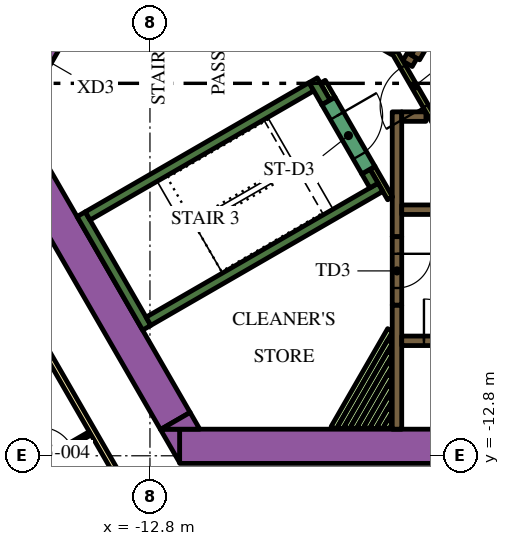
"""IFC4 building model, lengths in metres.
Left out: names, types, materials, properties, quantities, classifications, styles, units other than length and angle.
Written with IfcOpenShell. Run it as: python <this file> out.ifc"""

import sys

from ifc_helpers import new_model, si_unit, direction, frame, frame_2d, origin, place, context, subcontext, project, spatial, polyline, rectangle, outline, extrude, element, fill, save


model = new_model("IFC4")
c1 = context("Model", 3, precision=1e-05, world=origin(), true_north=direction((0.0, 1.0)))
c2 = subcontext(c1, "Body", "Model", "MODEL_VIEW")
j1 = project(units=[si_unit("LENGTHUNIT", "METRE"), si_unit("PLANEANGLEUNIT", "RADIAN")], contexts=[c1])
p1 = place(None, origin())
s1 = spatial("IfcSite", under=j1, at=p1, CompositionType="ELEMENT")
p2 = place(p1, origin())
s2 = spatial("IfcBuilding", under=s1, at=p2, CompositionType="ELEMENT")
p3 = place(p2, frame((0.0, 0.0, 74.4)))
s3 = spatial("IfcBuildingStorey", under=s2, at=p3, CompositionType="ELEMENT", Elevation=74.4)
p4 = place(p3, frame((-12.019, -12.55, 0.0), z_axis=(0.0, 0.0, 1.0), x_axis=(1.0, 0.0, 0.0)))
e1 = element("IfcWall", 1, at=p4, inside=s3, PredefinedType="SOLIDWALL", context=c2, shape_type="SweptSolid", body=[
    extrude(rectangle(XDim=21.63, YDim=0.9, at=frame_2d((10.815, 0.0))), origin(), (0.0, 0.0, 1.0), 3.9),
])
p5 = place(p3, origin())
e2 = element("IfcWall", 2, at=p5, inside=s3, PredefinedType="SOLIDWALL", context=c2, shape_type="SweptSolid", body=[
    extrude(outline(polyline([(-12.529, -12.1), (-12.021, -12.1), (-12.021, -12.98), (-12.529, -12.1)])), origin(), (0.0, 0.0, 1.0), 3.9),
])
p6 = place(p3, frame((-12.134, -11.883, 0.0), z_axis=(0.0, 0.0, 1.0), x_axis=(-0.500005339912, 0.866022320763, 0.0)))
e3 = element("IfcWall", 3, at=p6, inside=s3, PredefinedType="SOLIDWALL", context=c2, shape_type="SweptSolid", body=[
    extrude(rectangle(XDim=9.488, YDim=0.9, at=frame_2d((4.744, 0.0))), origin(), (0.0, 0.0, 1.0), 3.9),
])
e4 = element("IfcWall", 4, at=p5, inside=s3, PredefinedType="SOLIDWALL", context=c2, shape_type="SweptSolid", body=[
    extrude(outline(polyline([(-11.489, -12.1), (-12.505, -12.1), (-11.743, -11.66), (-11.489, -12.1)])), origin(), (0.0, 0.0, 1.0), 3.9),
])
p7 = place(p3, frame((-12.885, -9.431, 0.0), z_axis=(0.0, 0.0, 1.0), x_axis=(-0.500020560727, 0.866013532718, 0.0)))
e5 = element("IfcWall", 5, at=p7, inside=s3, PredefinedType="SOLIDWALL", context=c2, shape_type="SweptSolid", body=[
    extrude(rectangle(XDim=3.45, YDim=0.25, at=frame_2d((1.725, 0.0))), origin(), (0.0, 0.0, 1.0), 3.9),
])
p8 = place(p3, frame((-14.44, -6.49, 0.0), z_axis=(0.0, 0.0, 1.0), x_axis=(0.866022966069, 0.500004222222, 0.0)))
e6 = element("IfcWall", 6, at=p8, inside=s3, PredefinedType="SOLIDWALL", context=c2, shape_type="SweptSolid", body=[
    extrude(rectangle(XDim=6.8, YDim=0.25, at=frame_2d((3.4, 0.0))), origin(), (0.0, 0.0, 1.0), 3.9),
])
p9 = place(p3, frame((-8.168, -3.503, 0.0), z_axis=(0.0, 0.0, 1.0), x_axis=(-0.499952099219, 0.866053057547, 0.0)))
e7 = element("IfcWall", 7, at=p9, inside=s3, PredefinedType="SOLIDWALL", context=c2, shape_type="SweptSolid", body=[
    extrude(rectangle(XDim=0.675, YDim=0.25, at=frame_2d((0.337, 0.0))), origin(), (0.0, 0.0, 1.0), 3.9),
])
p10 = place(p3, frame((-12.84, -9.261, 0.0), z_axis=(0.0, 0.0, 1.0), x_axis=(0.866016039709, 0.500016218704, 0.0)))
e8 = element("IfcWall", 8, at=p10, inside=s3, PredefinedType="SOLIDWALL", context=c2, shape_type="SweptSolid", body=[
    extrude(rectangle(XDim=7.05, YDim=0.25, at=frame_2d((3.525, 0.0))), origin(), (0.0, 0.0, 1.0), 3.9),
])
p11 = place(p3, frame((-6.905, -5.69, 0.0), z_axis=(0.0, 0.0, 1.0), x_axis=(-0.500402024738, 0.865793170242, 0.0)))
e9 = element("IfcWall", 9, at=p11, inside=s3, PredefinedType="SOLIDWALL", context=c2, shape_type="SweptSolid", body=[
    extrude(rectangle(XDim=0.425, YDim=0.25, at=frame_2d((0.212, 0.0))), origin(), (0.0, 0.0, 1.0), 3.9),
])
p12 = place(p3, frame((-6.3, -12.1, 0.0), z_axis=(0.0, 0.0, 1.0), x_axis=(0.0, 1.0, 0.0)))
e10 = element("IfcWall", 10, at=p12, inside=s3, PredefinedType="SOLIDWALL", context=c2, shape_type="SweptSolid", body=[
    extrude(rectangle(XDim=3.265, YDim=0.25, at=frame_2d((1.632, 0.0))), origin(), (0.0, 0.0, 1.0), 3.9),
])
p13 = place(p3, frame((-6.3, -7.035, 0.0), z_axis=(0.0, 0.0, 1.0), x_axis=(0.0, 1.0, 0.0)))
e11 = element("IfcWall", 11, at=p13, inside=s3, PredefinedType="SOLIDWALL", context=c2, shape_type="SweptSolid", body=[
    extrude(rectangle(XDim=3.285, YDim=0.25, at=frame_2d((1.643, 0.0))), origin(), (0.0, 0.0, 1.0), 3.9),
])
p14 = place(p3, frame((-6.175, -3.875, 0.0), z_axis=(0.0, 0.0, 1.0), x_axis=(1.0, 0.0, 0.0)))
e12 = element("IfcWall", 12, at=p14, inside=s3, PredefinedType="SOLIDWALL", context=c2, shape_type="SweptSolid", body=[
    extrude(rectangle(XDim=0.637, YDim=0.25, at=frame_2d((0.318, 0.0))), origin(), (0.0, 0.0, 1.0), 3.9),
])
p15 = place(p3, frame((-6.088, -2.305, 0.0), z_axis=(0.0, 0.0, 1.0), x_axis=(0.866059450854, -0.499941024108, 0.0)))
e13 = element("IfcWall", 13, at=p15, inside=s3, PredefinedType="SOLIDWALL", context=c2, shape_type="SweptSolid", body=[
    extrude(rectangle(XDim=0.29, YDim=0.25, at=frame_2d((0.145, 0.0))), origin(), (0.0, 0.0, 1.0), 3.9),
])
p16 = place(p3, frame((-7.889, -1.265, 0.0), z_axis=(0.0, 0.0, 1.0), x_axis=(0.865986741702, -0.500066958712, 0.0)))
e14 = element("IfcWall", 14, at=p16, inside=s3, PredefinedType="SOLIDWALL", context=c2, shape_type="SweptSolid", body=[
    extrude(rectangle(XDim=1.738, YDim=0.25, at=frame_2d((0.869, 0.0))), origin(), (0.0, 0.0, 1.0), 3.9),
])
p17 = place(p3, frame((-7.968, -12.068, 0.0), z_axis=(0.0, 0.0, 1.0), x_axis=(0.500013701029, 0.866017493347, 0.0)))
e15 = element("IfcWall", 15, at=p17, inside=s3, PredefinedType="PARTITIONING", context=c2, shape_type="SweptSolid", body=[
    extrude(rectangle(XDim=2.975, YDim=0.15, at=frame_2d((1.488, 0.0))), origin(), (0.0, 0.0, 1.0), 2.7),
])
p18 = place(p3, frame((-7.794, -12.068, 0.0), z_axis=(0.0, 0.0, 1.0), x_axis=(0.499985098601, 0.86603400694, 0.0)))
e16 = element("IfcWall", 16, at=p18, inside=s3, PredefinedType="PARTITIONING", context=c2, shape_type="SweptSolid", body=[
    extrude(rectangle(XDim=2.628, YDim=0.15, at=frame_2d((1.314, 0.0))), origin(), (0.0, 0.0, 1.0), 2.7),
])
p19 = place(p3, frame((-7.621, -12.068, 0.0), z_axis=(0.0, 0.0, 1.0), x_axis=(0.500028047758, 0.866009209798, 0.0)))
e17 = element("IfcWall", 17, at=p19, inside=s3, PredefinedType="PARTITIONING", context=c2, shape_type="SweptSolid", body=[
    extrude(rectangle(XDim=2.282, YDim=0.15, at=frame_2d((1.141, 0.0))), origin(), (0.0, 0.0, 1.0), 2.7),
])
p20 = place(p3, frame((-7.448, -12.068, 0.0), z_axis=(0.0, 0.0, 1.0), x_axis=(0.500031751504, 0.866007071269, 0.0)))
e18 = element("IfcWall", 18, at=p20, inside=s3, PredefinedType="PARTITIONING", context=c2, shape_type="SweptSolid", body=[
    extrude(rectangle(XDim=1.936, YDim=0.15, at=frame_2d((0.968, 0.0))), origin(), (0.0, 0.0, 1.0), 2.7),
])
p21 = place(p3, frame((-7.275, -12.068, 0.0), z_axis=(0.0, 0.0, 1.0), x_axis=(0.499988385283, 0.86603210944, 0.0)))
e19 = element("IfcWall", 19, at=p21, inside=s3, PredefinedType="PARTITIONING", context=c2, shape_type="SweptSolid", body=[
    extrude(rectangle(XDim=1.589, YDim=0.15, at=frame_2d((0.795, 0.0))), origin(), (0.0, 0.0, 1.0), 2.7),
])
p22 = place(p3, frame((-7.102, -12.068, 0.0), z_axis=(0.0, 0.0, 1.0), x_axis=(0.500068153333, 0.865986051864, 0.0)))
e20 = element("IfcWall", 20, at=p22, inside=s3, PredefinedType="PARTITIONING", context=c2, shape_type="SweptSolid", body=[
    extrude(rectangle(XDim=1.243, YDim=0.15, at=frame_2d((0.622, 0.0))), origin(), (0.0, 0.0, 1.0), 2.7),
])
p23 = place(p3, frame((-6.928, -12.068, 0.0), z_axis=(0.0, 0.0, 1.0), x_axis=(0.500005339912, 0.866022320763, 0.0)))
e21 = element("IfcWall", 21, at=p23, inside=s3, PredefinedType="PARTITIONING", context=c2, shape_type="SweptSolid", body=[
    extrude(rectangle(XDim=0.896, YDim=0.15, at=frame_2d((0.448, 0.0))), origin(), (0.0, 0.0, 1.0), 2.7),
])
p24 = place(p3, frame((-6.755, -12.068, 0.0), z_axis=(0.0, 0.0, 1.0), x_axis=(0.500196256984, 0.865912065108, 0.0)))
e22 = element("IfcWall", 22, at=p24, inside=s3, PredefinedType="PARTITIONING", context=c2, shape_type="SweptSolid", body=[
    extrude(rectangle(XDim=0.55, YDim=0.15, at=frame_2d((0.275, 0.0))), origin(), (0.0, 0.0, 1.0), 2.7),
])
p25 = place(p3, frame((-6.582, -12.068, 0.0), z_axis=(0.0, 0.0, 1.0), x_axis=(0.499618727529, 0.866245419672, 0.0)))
e23 = element("IfcWall", 23, at=p25, inside=s3, PredefinedType="PARTITIONING", context=c2, shape_type="SweptSolid", body=[
    extrude(rectangle(XDim=0.204, YDim=0.15, at=frame_2d((0.102, 0.0))), origin(), (0.0, 0.0, 1.0), 2.7),
])
p26 = place(p3, frame((-6.48, -6.027, 0.0), z_axis=(0.0, 0.0, 1.0), x_axis=(-0.499927229454, 0.866067413802, 0.0)))
e24 = element("IfcWall", 24, at=p26, inside=s3, PredefinedType="PARTITIONING", context=c2, shape_type="SweptSolid", body=[
    extrude(rectangle(XDim=0.929, YDim=0.15, at=frame_2d((0.464, 0.0))), origin(), (0.0, 0.0, 1.0), 3.9),
])
p27 = place(p3, frame((-8.252, -2.958, 0.0), z_axis=(0.0, 0.0, 1.0), x_axis=(0.500174715838, -0.865924508047, 0.0)))
e25 = element("IfcWall", 25, at=p27, inside=s3, PredefinedType="PARTITIONING", context=c2, shape_type="SweptSolid", body=[
    extrude(rectangle(XDim=0.514, YDim=0.15, at=frame_2d((0.257, 0.0))), origin(), (0.0, 0.0, 1.0), 2.7),
])
p28 = place(p3, frame((-6.175, -9.775, 0.0), z_axis=(0.0, 0.0, 1.0), x_axis=(1.0, 0.0, 0.0)))
e26 = element("IfcWall", 26, at=p28, inside=s3, PredefinedType="SOLIDWALL", context=c2, shape_type="SweptSolid", body=[
    extrude(rectangle(XDim=12.35, YDim=0.25, at=frame_2d((6.175, 0.0))), origin(), (0.0, 0.0, 1.0), 3.9),
])
p29 = place(p28, frame((0.585, 0.0, 0.0)))
e27 = element("IfcOpeningElement", 27, at=p29, cuts=e26, PredefinedType="OPENING", context=c2, shape_type="SweptSolid", body=[
    extrude(rectangle(XDim=1.1, YDim=2.1, at=frame_2d((0.55, 1.05))), frame((0.0, 0.135, 0.0), z_axis=(0.0, -1.0, 0.0), x_axis=(1.0, 0.0, 0.0)), (0.0, 0.0, 1.0), 0.27),
])
p30 = place(p28, frame((3.105, 0.0, 0.0)))
e28 = element("IfcOpeningElement", 28, at=p30, cuts=e26, PredefinedType="OPENING", context=c2, shape_type="SweptSolid", body=[
    extrude(rectangle(XDim=1.1, YDim=2.1, at=frame_2d((0.55, 1.05))), frame((0.0, 0.135, 0.0), z_axis=(0.0, -1.0, 0.0), x_axis=(1.0, 0.0, 0.0)), (0.0, 0.0, 1.0), 0.27),
])
p31 = place(p28, frame((5.625, 0.0, 0.0)))
e29 = element("IfcOpeningElement", 29, at=p31, cuts=e26, PredefinedType="OPENING", context=c2, shape_type="SweptSolid", body=[
    extrude(rectangle(XDim=1.1, YDim=2.1, at=frame_2d((0.55, 1.05))), frame((0.0, 0.135, 0.0), z_axis=(0.0, -1.0, 0.0), x_axis=(1.0, 0.0, 0.0)), (0.0, 0.0, 1.0), 0.27),
])
p32 = place(p28, frame((8.145, 0.0, 0.0)))
e30 = element("IfcOpeningElement", 30, at=p32, cuts=e26, PredefinedType="OPENING", context=c2, shape_type="SweptSolid", body=[
    extrude(rectangle(XDim=1.1, YDim=2.1, at=frame_2d((0.55, 1.05))), frame((0.0, 0.135, 0.0), z_axis=(0.0, -1.0, 0.0), x_axis=(1.0, 0.0, 0.0)), (0.0, 0.0, 1.0), 0.27),
])
p33 = place(p28, frame((10.665, 0.0, 0.0)))
e31 = element("IfcOpeningElement", 31, at=p33, cuts=e26, PredefinedType="OPENING", context=c2, shape_type="SweptSolid", body=[
    extrude(rectangle(XDim=1.1, YDim=2.1, at=frame_2d((0.55, 1.05))), frame((0.0, 0.135, 0.0), z_axis=(0.0, -1.0, 0.0), x_axis=(1.0, 0.0, 0.0)), (0.0, 0.0, 1.0), 0.27),
])
p34 = place(p3, frame((-6.175, -6.325, 0.0), z_axis=(0.0, 0.0, 1.0), x_axis=(1.0, 0.0, 0.0)))
e32 = element("IfcWall", 32, at=p34, inside=s3, PredefinedType="SOLIDWALL", context=c2, shape_type="SweptSolid", body=[
    extrude(rectangle(XDim=12.35, YDim=0.25, at=frame_2d((6.175, 0.0))), origin(), (0.0, 0.0, 1.0), 3.9),
])
p35 = place(p34, frame((3.205, 0.0, 0.0)))
e33 = element("IfcOpeningElement", 33, at=p35, cuts=e32, PredefinedType="OPENING", context=c2, shape_type="SweptSolid", body=[
    extrude(rectangle(XDim=0.9, YDim=2.1, at=frame_2d((0.45, 1.05))), frame((0.0, 0.135, 0.0), z_axis=(0.0, -1.0, 0.0), x_axis=(1.0, 0.0, 0.0)), (0.0, 0.0, 1.0), 0.27),
])
p36 = place(p34, frame((8.145, 0.0, 0.0)))
e34 = element("IfcOpeningElement", 34, at=p36, cuts=e32, PredefinedType="OPENING", context=c2, shape_type="SweptSolid", body=[
    extrude(rectangle(XDim=1.1, YDim=2.1, at=frame_2d((0.55, 1.05))), frame((0.0, 0.135, 0.0), z_axis=(0.0, -1.0, 0.0), x_axis=(1.0, 0.0, 0.0)), (0.0, 0.0, 1.0), 0.27),
])
p37 = place(p34, frame((10.665, 0.0, 0.0)))
e35 = element("IfcOpeningElement", 35, at=p37, cuts=e32, PredefinedType="OPENING", context=c2, shape_type="SweptSolid", body=[
    extrude(rectangle(XDim=1.1, YDim=2.1, at=frame_2d((0.55, 1.05))), frame((0.0, 0.135, 0.0), z_axis=(0.0, -1.0, 0.0), x_axis=(1.0, 0.0, 0.0)), (0.0, 0.0, 1.0), 0.27),
])
p38 = place(p3, frame((-0.898, 6.194, 0.0), z_axis=(0.0, 0.0, 1.0), x_axis=(-0.499996202215, -0.866027596426, 0.0)))
e36 = element("IfcWall", 36, at=p38, inside=s3, PredefinedType="SOLIDWALL", context=c2, shape_type="SweptSolid", body=[
    extrude(rectangle(XDim=9.83, YDim=0.25, at=frame_2d((4.915, 0.0))), origin(), (0.0, 0.0, 1.0), 3.9),
])
p39 = place(p38, frame((0.585, 0.0, 0.0)))
e37 = element("IfcOpeningElement", 37, at=p39, cuts=e36, PredefinedType="OPENING", context=c2, shape_type="SweptSolid", body=[
    extrude(rectangle(XDim=1.1, YDim=2.1, at=frame_2d((0.55, 1.05))), frame((0.0, 0.135, 0.0), z_axis=(0.0, -1.0, 0.0), x_axis=(1.0, 0.0, 0.0)), (0.0, 0.0, 1.0), 0.27),
])
p40 = place(p38, frame((3.105, 0.0, 0.0)))
e38 = element("IfcOpeningElement", 38, at=p40, cuts=e36, PredefinedType="OPENING", context=c2, shape_type="SweptSolid", body=[
    extrude(rectangle(XDim=1.1, YDim=2.1, at=frame_2d((0.55, 1.05))), frame((0.0, 0.135, 0.0), z_axis=(0.0, -1.0, 0.0), x_axis=(1.0, 0.0, 0.0)), (0.0, 0.0, 1.0), 0.27),
])
p41 = place(p38, frame((5.625, 0.0, 0.0)))
e39 = element("IfcOpeningElement", 39, at=p41, cuts=e36, PredefinedType="OPENING", context=c2, shape_type="SweptSolid", body=[
    extrude(rectangle(XDim=1.1, YDim=2.1, at=frame_2d((0.55, 1.05))), frame((0.0, 0.135, 0.0), z_axis=(0.0, -1.0, 0.0), x_axis=(1.0, 0.0, 0.0)), (0.0, 0.0, 1.0), 0.27),
])
p42 = place(p38, frame((8.145, 0.0, 0.0)))
e40 = element("IfcOpeningElement", 40, at=p42, cuts=e36, PredefinedType="OPENING", context=c2, shape_type="SweptSolid", body=[
    extrude(rectangle(XDim=1.1, YDim=2.1, at=frame_2d((0.55, 1.05))), frame((0.0, 0.135, 0.0), z_axis=(0.0, -1.0, 0.0), x_axis=(1.0, 0.0, 0.0)), (0.0, 0.0, 1.0), 0.27),
])
p43 = place(p3, frame((-8.103, -3.466, 0.0), z_axis=(0.0, 0.0, 1.0), x_axis=(0.500078061341, -0.865980330357, 0.0)))
e41 = element("IfcWall", 41, at=p43, inside=s3, PredefinedType="SOLIDWALL", context=c2, shape_type="SweptSolid", body=[
    extrude(rectangle(XDim=2.1, YDim=0.4, at=frame_2d((1.05, 0.0))), origin(), (0.0, 0.0, 1.0), 3.9),
])
p44 = place(p43, frame((0.45, 0.0, 0.0)))
e42 = element("IfcOpeningElement", 42, at=p44, cuts=e41, PredefinedType="OPENING", context=c2, shape_type="SweptSolid", body=[
    extrude(rectangle(XDim=1.2, YDim=2.1, at=frame_2d((0.6, 1.05))), frame((0.0, 0.21, 0.0), z_axis=(0.0, -1.0, 0.0), x_axis=(1.0, 0.0, 0.0)), (0.0, 0.0, 1.0), 0.42),
])
p45 = place(p3, frame((-6.3, -7.035, 0.0), z_axis=(0.0, 0.0, 1.0), x_axis=(0.0, -1.0, 0.0)))
e43 = element("IfcWall", 43, at=p45, inside=s3, PredefinedType="SOLIDWALL", context=c2, shape_type="SweptSolid", body=[
    extrude(rectangle(XDim=1.8, YDim=0.25, at=frame_2d((0.9, 0.0))), origin(), (0.0, 0.0, 1.0), 3.9),
])
p46 = place(p45, frame((0.45, 0.0, 0.0)))
e44 = element("IfcOpeningElement", 44, at=p46, cuts=e43, PredefinedType="OPENING", context=c2, shape_type="SweptSolid", body=[
    extrude(rectangle(XDim=0.9, YDim=2.1, at=frame_2d((0.45, 1.05))), frame((0.0, 0.135, 0.0), z_axis=(0.0, -1.0, 0.0), x_axis=(1.0, 0.0, 0.0)), (0.0, 0.0, 1.0), 0.27),
])
p47 = place(p3, frame((-5.317, -3.99, 0.0), z_axis=(0.0, 0.0, 1.0), x_axis=(-0.500027713859, 0.866009402589, 0.0)))
e45 = element("IfcWall", 45, at=p47, inside=s3, PredefinedType="PARTITIONING", context=c2, shape_type="SweptSolid", body=[
    extrude(rectangle(XDim=2.1, YDim=0.15, at=frame_2d((1.05, 0.0))), origin(), (0.0, 0.0, 1.0), 3.9),
])
p48 = place(p47, frame((0.45, 0.0, 0.0)))
e46 = element("IfcOpeningElement", 46, at=p48, cuts=e45, PredefinedType="OPENING", context=c2, shape_type="SweptSolid", body=[
    extrude(rectangle(XDim=1.2, YDim=2.1, at=frame_2d((0.6, 1.05))), frame((0.0, 0.085, 0.0), z_axis=(0.0, -1.0, 0.0), x_axis=(1.0, 0.0, 0.0)), (0.0, 0.0, 1.0), 0.17),
])
p49 = place(p3, frame((-16.209, -2.976, 0.0), z_axis=(0.0, 0.0, 1.0), x_axis=(0.499954529098, 0.86605165483, 0.0)))
e47 = element("IfcWall", 47, at=p49, inside=s3, PredefinedType="SOLIDWALL", context=c2, shape_type="SweptSolid", body=[
    extrude(rectangle(XDim=1.7, YDim=0.9, at=frame_2d((0.85, 0.0))), origin(), (0.0, 0.0, 1.0), 3.9),
])
p50 = place(p49, frame((0.25, 0.0, 0.0)))
e48 = element("IfcOpeningElement", 48, at=p50, cuts=e47, PredefinedType="OPENING", context=c2, shape_type="SweptSolid", body=[
    extrude(rectangle(XDim=1.2, YDim=2.1, at=frame_2d((0.6, 1.05))), frame((0.0, 0.46, 0.0), z_axis=(0.0, -1.0, 0.0), x_axis=(1.0, 0.0, 0.0)), (0.0, 0.0, 1.0), 0.92),
])
p51 = place(p3, frame((-19.081, -3.9, 0.0), z_axis=(0.0, 0.0, 1.0), x_axis=(0.499998313975, 0.866026377209, 0.0)))
e49 = element("IfcWall", 49, at=p51, inside=s3, PredefinedType="PARTITIONING", context=c2, shape_type="SweptSolid", body=[
    extrude(rectangle(XDim=25.766, YDim=0.15, at=frame_2d((12.883, 0.0))), origin(), (0.0, 0.0, 1.0), 2.7),
])
p52 = place(p51, frame((24.265, 0.0, 0.0)))
e50 = element("IfcOpeningElement", 50, at=p52, cuts=e49, PredefinedType="OPENING", context=c2, shape_type="SweptSolid", body=[
    extrude(rectangle(XDim=1.0, YDim=2.1, at=frame_2d((0.5, 1.05))), frame((0.0, 0.085, 0.0), z_axis=(0.0, -1.0, 0.0), x_axis=(1.0, 0.0, 0.0)), (0.0, 0.0, 1.0), 0.17),
])
p53 = place(p51, frame((13.146, 0.0, 0.0)))
e51 = element("IfcOpeningElement", 51, at=p53, cuts=e49, PredefinedType="OPENING", context=c2, shape_type="SweptSolid", body=[
    extrude(rectangle(XDim=1.1, YDim=2.1, at=frame_2d((0.55, 1.05))), frame((0.0, 0.085, 0.0), z_axis=(0.0, -1.0, 0.0), x_axis=(1.0, 0.0, 0.0)), (0.0, 0.0, 1.0), 0.17),
])
p54 = place(p51, frame((11.693, 0.0, 0.0)))
e52 = element("IfcOpeningElement", 52, at=p54, cuts=e49, PredefinedType="OPENING", context=c2, shape_type="SweptSolid", body=[
    extrude(rectangle(XDim=1.0, YDim=2.1, at=frame_2d((0.5, 1.05))), frame((0.0, 0.085, 0.0), z_axis=(0.0, -1.0, 0.0), x_axis=(1.0, 0.0, 0.0)), (0.0, 0.0, 1.0), 0.17),
])
p55 = place(p51, frame((0.18, 0.0, 0.0)))
e53 = element("IfcOpeningElement", 53, at=p55, cuts=e49, PredefinedType="OPENING", context=c2, shape_type="SweptSolid", body=[
    extrude(rectangle(XDim=1.0, YDim=2.1, at=frame_2d((0.5, 1.05))), frame((0.0, 0.085, 0.0), z_axis=(0.0, -1.0, 0.0), x_axis=(1.0, 0.0, 0.0)), (0.0, 0.0, 1.0), 0.17),
])
p56 = place(p3, frame((-12.918, -14.575, 0.0), z_axis=(0.0, 0.0, 1.0), x_axis=(-0.500009150678, 0.866020120573, 0.0)))
e54 = element("IfcWall", 54, at=p56, inside=s3, PredefinedType="PARTITIONING", context=c2, shape_type="SweptSolid", body=[
    extrude(rectangle(XDim=5.258, YDim=0.15, at=frame_2d((2.629, 0.0))), origin(), (0.0, 0.0, 1.0), 2.7),
])
p57 = place(p56, frame((0.18, 0.0, 0.0)))
e55 = element("IfcOpeningElement", 55, at=p57, cuts=e54, PredefinedType="OPENING", context=c2, shape_type="SweptSolid", body=[
    extrude(rectangle(XDim=1.0, YDim=2.1, at=frame_2d((0.5, 1.05))), frame((0.0, 0.085, 0.0), z_axis=(0.0, -1.0, 0.0), x_axis=(1.0, 0.0, 0.0)), (0.0, 0.0, 1.0), 0.17),
])
p58 = place(p3, frame((-16.797, -13.606, 0.0), z_axis=(0.0, 0.0, 1.0), x_axis=(0.866034573852, 0.49998411664, 0.0)))
e56 = element("IfcWall", 56, at=p58, inside=s3, PredefinedType="PARTITIONING", context=c2, shape_type="SweptSolid", body=[
    extrude(rectangle(XDim=2.8, YDim=0.1, at=frame_2d((1.4, 0.0))), origin(), (0.0, 0.0, 1.0), 2.7),
])
p59 = place(p58, frame((1.3, 0.0, 0.0)))
e57 = element("IfcOpeningElement", 57, at=p59, cuts=e56, PredefinedType="OPENING", context=c2, shape_type="SweptSolid", body=[
    extrude(rectangle(XDim=0.9, YDim=2.1, at=frame_2d((0.45, 1.05))), frame((0.0, 0.06, 0.0), z_axis=(0.0, -1.0, 0.0), x_axis=(1.0, 0.0, 0.0)), (0.0, 0.0, 1.0), 0.12),
])
p60 = place(p29, origin())
e58 = element("IfcDoor", 58, at=p60, inside=s3, OperationType="DOUBLE_DOOR_SLIDING", PredefinedType="DOOR", context=c2, shape_type="SweptSolid", body=[
    extrude(rectangle(XDim=1.1, YDim=2.1, at=frame_2d((0.55, 1.05))), frame((0.0, 0.025, 0.0), z_axis=(0.0, -1.0, 0.0), x_axis=(1.0, 0.0, 0.0)), (0.0, 0.0, 1.0), 0.05),
])
fill(e27, e58)
p61 = place(p44, origin())
e59 = element("IfcDoor", 59, at=p61, inside=s3, OperationType="SINGLE_SWING_LEFT", PredefinedType="DOOR", context=c2, shape_type="SweptSolid", body=[
    extrude(rectangle(XDim=1.2, YDim=2.1, at=frame_2d((0.6, 1.05))), frame((0.0, 0.025, 0.0), z_axis=(0.0, -1.0, 0.0), x_axis=(1.0, 0.0, 0.0)), (0.0, 0.0, 1.0), 0.05),
])
fill(e42, e59)
p62 = place(p46, origin())
e60 = element("IfcDoor", 60, at=p62, inside=s3, OperationType="SINGLE_SWING_LEFT", PredefinedType="DOOR", context=c2, shape_type="SweptSolid", body=[
    extrude(rectangle(XDim=0.9, YDim=2.1, at=frame_2d((0.45, 1.05))), frame((0.0, 0.025, 0.0), z_axis=(0.0, -1.0, 0.0), x_axis=(1.0, 0.0, 0.0)), (0.0, 0.0, 1.0), 0.05),
])
fill(e44, e60)
p63 = place(p48, origin())
e61 = element("IfcDoor", 61, at=p63, inside=s3, OperationType="SINGLE_SWING_LEFT", PredefinedType="DOOR", context=c2, shape_type="SweptSolid", body=[
    extrude(rectangle(XDim=1.2, YDim=2.1, at=frame_2d((0.6, 1.05))), frame((0.0, 0.025, 0.0), z_axis=(0.0, -1.0, 0.0), x_axis=(1.0, 0.0, 0.0)), (0.0, 0.0, 1.0), 0.05),
])
fill(e46, e61)
p64 = place(p59, origin())
e62 = element("IfcDoor", 62, at=p64, inside=s3, OperationType="SINGLE_SWING_LEFT", PredefinedType="DOOR", context=c2, shape_type="SweptSolid", body=[
    extrude(rectangle(XDim=0.9, YDim=2.1, at=frame_2d((0.45, 1.05))), frame((0.0, 0.025, 0.0), z_axis=(0.0, -1.0, 0.0), x_axis=(1.0, 0.0, 0.0)), (0.0, 0.0, 1.0), 0.05),
])
fill(e57, e62)
save(model, sys.argv[1])
